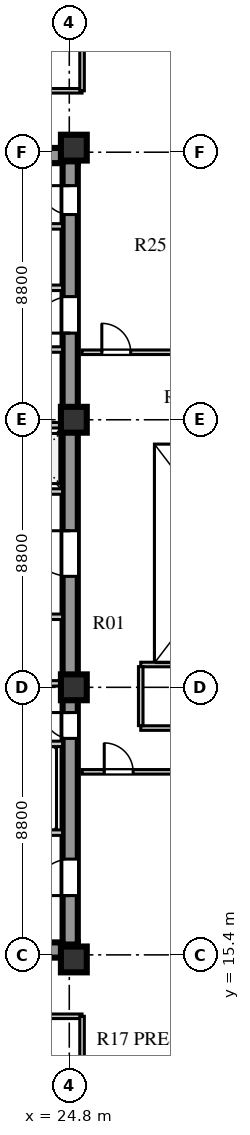
"""IFC4 building model, lengths in metres.
Left out: names, types, materials, properties, quantities, classifications, styles, units other than length and angle.
Written with IfcOpenShell. Run it as: python <this file> out.ifc"""

import sys

from ifc_helpers import new_model, si_unit, direction, frame, frame_2d, origin, origin_2d, place, context, subcontext, project, spatial, rectangle, extrude, element, fill, save


model = new_model("IFC4")
c1 = context("Model", 3, precision=1e-05, world=origin(), true_north=direction((0.0, 1.0)))
c2 = subcontext(c1, "Body", "Model", "MODEL_VIEW")
j1 = project(units=[si_unit("LENGTHUNIT", "METRE"), si_unit("PLANEANGLEUNIT", "RADIAN")], contexts=[c1])
p1 = place(None, origin())
s1 = spatial("IfcSite", under=j1, at=p1, CompositionType="ELEMENT")
p2 = place(p1, origin())
s2 = spatial("IfcBuilding", under=s1, at=p2, CompositionType="ELEMENT")
p3 = place(p2, frame((0.0, 0.0, 196.4)))
s3 = spatial("IfcBuildingStorey", under=s2, at=p3, CompositionType="ELEMENT", Elevation=196.4)
for number, where, z_axis, x_axis in (
    (1, (15.4, 15.56, 0.0), (0.0, 0.0, 1.0), (1.0, 0.0, 0.0)),
    (2, (15.4, 41.69, 0.0), (0.0, 0.0, 1.0), (1.0, 0.0, 0.0)),
):
    element("IfcWall", number, at=place(p3, frame(where, z_axis=z_axis, x_axis=x_axis)), inside=s3, PredefinedType="SHEAR", context=c2, shape_type="SweptSolid", body=[
        extrude(rectangle(XDim=9.68, YDim=0.5, at=frame_2d((4.84, 0.0))), origin(), (0.0, 0.0, 1.0), 3.6),
    ])
p4 = place(p3, frame((24.83, 15.74, 0.0), z_axis=(0.0, 0.0, 1.0), x_axis=(0.0, 1.0, 0.0)))
e3 = element("IfcWall", 3, at=p4, inside=s3, PredefinedType="SHEAR", context=c2, shape_type="SweptSolid", body=[
    extrude(rectangle(XDim=25.76, YDim=0.5, at=frame_2d((12.88, 0.0))), origin(), (0.0, 0.0, 1.0), 3.6),
])
p5 = place(p4, frame((1.61, 0.0, 0.0)))
e4 = element("IfcOpeningElement", 4, at=p5, cuts=e3, PredefinedType="OPENING", context=c2, shape_type="SweptSolid", body=[
    extrude(rectangle(XDim=1.2, YDim=2.1, at=frame_2d((0.6, 1.05))), frame((0.0, 0.26, 0.0), z_axis=(0.0, -1.0, 0.0), x_axis=(1.0, 0.0, 0.0)), (0.0, 0.0, 1.0), 0.52),
])
p6 = place(p4, frame((6.78, 0.0, 0.0)))
e5 = element("IfcOpeningElement", 5, at=p6, cuts=e3, PredefinedType="OPENING", context=c2, shape_type="SweptSolid", body=[
    extrude(rectangle(XDim=0.85, YDim=2.06, at=frame_2d((0.425, 1.03))), frame((0.0, 0.26, 0.0), z_axis=(0.0, -1.0, 0.0), x_axis=(1.0, 0.0, 0.0)), (0.0, 0.0, 1.0), 0.52),
])
p7 = place(p4, frame((12.11, 0.0, 0.0)))
e6 = element("IfcOpeningElement", 6, at=p7, cuts=e3, PredefinedType="OPENING", context=c2, shape_type="SweptSolid", body=[
    extrude(rectangle(XDim=1.5, YDim=2.12, at=frame_2d((0.75, 1.06))), frame((0.0, 0.26, 0.0), z_axis=(0.0, -1.0, 0.0), x_axis=(1.0, 0.0, 0.0)), (0.0, 0.0, 1.0), 0.52),
])
p8 = place(p4, frame((20.11, 0.0, 0.0)))
e7 = element("IfcOpeningElement", 7, at=p8, cuts=e3, PredefinedType="OPENING", context=c2, shape_type="SweptSolid", body=[
    extrude(rectangle(XDim=1.2, YDim=2.12, at=frame_2d((0.6, 1.06))), frame((0.0, 0.26, 0.0), z_axis=(0.0, -1.0, 0.0), x_axis=(1.0, 0.0, 0.0)), (0.0, 0.0, 1.0), 0.52),
])
p9 = place(p4, frame((24.01, 0.0, 0.0)))
e8 = element("IfcOpeningElement", 8, at=p9, cuts=e3, PredefinedType="OPENING", context=c2, shape_type="SweptSolid", body=[
    extrude(rectangle(XDim=0.95, YDim=2.1, at=frame_2d((0.475, 1.05))), frame((0.0, 0.26, 0.0), z_axis=(0.0, -1.0, 0.0), x_axis=(1.0, 0.0, 0.0)), (0.0, 0.0, 1.0), 0.52),
])
for number, where, z_axis, x_axis in (
    (9, (24.95, 15.25, 0.0), (0.0, 0.0, 1.0), (1.0, 0.0, 0.0)),
    (10, (24.95, 24.2, 0.0), (0.0, 0.0, 1.0), (1.0, 0.0, 0.0)),
    (11, (24.95, 33.0, 0.0), (0.0, 0.0, 1.0), (1.0, 0.0, 0.0)),
    (12, (24.95, 41.95, 0.0), (0.0, 0.0, 1.0), (1.0, 0.0, 0.0)),
):
    element("IfcColumn", number, at=place(p3, frame(where, z_axis=z_axis, x_axis=x_axis)), inside=s3, PredefinedType="COLUMN", context=c2, shape_type="SweptSolid", body=[
        extrude(rectangle(XDim=0.85, YDim=0.85, at=origin_2d()), origin(), (0.0, 0.0, 1.0), 3.6),
    ])
p10 = place(p3, frame((19.64, 19.42, 0.0), z_axis=(0.0, 0.0, 1.0), x_axis=(1.0, 0.0, 0.0)))
e13 = element("IfcWall", 13, at=p10, inside=s3, PredefinedType="SOLIDWALL", context=c2, shape_type="SweptSolid", body=[
    extrude(rectangle(XDim=4.94, YDim=0.18, at=frame_2d((2.47, 0.0))), origin(), (0.0, 0.0, 1.0), 3.6),
])
p11 = place(p10, frame((0.72, 0.0, 0.0)))
e14 = element("IfcOpeningElement", 14, at=p11, cuts=e13, PredefinedType="OPENING", context=c2, shape_type="SweptSolid", body=[
    extrude(rectangle(XDim=1.1, YDim=2.1, at=frame_2d((0.55, 1.05))), frame((0.0, 0.1, 0.0), z_axis=(0.0, -1.0, 0.0), x_axis=(1.0, 0.0, 0.0)), (0.0, 0.0, 1.0), 0.2),
])
p12 = place(p10, frame((3.02, 0.0, 0.0)))
e15 = element("IfcOpeningElement", 15, at=p12, cuts=e13, PredefinedType="OPENING", context=c2, shape_type="SweptSolid", body=[
    extrude(rectangle(XDim=1.1, YDim=2.1, at=frame_2d((0.55, 1.05))), frame((0.0, 0.1, 0.0), z_axis=(0.0, -1.0, 0.0), x_axis=(1.0, 0.0, 0.0)), (0.0, 0.0, 1.0), 0.2),
])
p13 = place(p3, frame((19.64, 22.34, 0.0), z_axis=(0.0, 0.0, 1.0), x_axis=(1.0, 0.0, 0.0)))
e16 = element("IfcWall", 16, at=p13, inside=s3, PredefinedType="SOLIDWALL", context=c2, shape_type="SweptSolid", body=[
    extrude(rectangle(XDim=4.94, YDim=0.18, at=frame_2d((2.47, 0.0))), origin(), (0.0, 0.0, 1.0), 3.6),
])
p14 = place(p3, frame((15.9, 26.52, 0.0), z_axis=(0.0, 0.0, 1.0), x_axis=(1.0, 0.0, 0.0)))
e17 = element("IfcWall", 17, at=p14, inside=s3, PredefinedType="SOLIDWALL", context=c2, shape_type="SweptSolid", body=[
    extrude(rectangle(XDim=8.68, YDim=0.18, at=frame_2d((4.34, 0.0))), origin(), (0.0, 0.0, 1.0), 3.6),
])
p15 = place(p14, frame((3.3, 0.0, 0.0)))
e18 = element("IfcOpeningElement", 18, at=p15, cuts=e17, PredefinedType="OPENING", context=c2, shape_type="SweptSolid", body=[
    extrude(rectangle(XDim=0.95, YDim=2.1, at=frame_2d((0.475, 1.05))), frame((0.0, 0.1, 0.0), z_axis=(0.0, -1.0, 0.0), x_axis=(1.0, 0.0, 0.0)), (0.0, 0.0, 1.0), 0.2),
])
p16 = place(p3, frame((15.9, 24.33, 0.0), z_axis=(0.0, 0.0, 1.0), x_axis=(1.0, 0.0, 0.0)))
e19 = element("IfcWall", 19, at=p16, inside=s3, PredefinedType="SOLIDWALL", context=c2, shape_type="SweptSolid", body=[
    extrude(rectangle(XDim=8.68, YDim=0.18, at=frame_2d((4.34, 0.0))), origin(), (0.0, 0.0, 1.0), 2.95),
])
p17 = place(p3, frame((15.9, 30.64, 0.0), z_axis=(0.0, 0.0, 1.0), x_axis=(1.0, 0.0, 0.0)))
e20 = element("IfcWall", 20, at=p17, inside=s3, PredefinedType="SOLIDWALL", context=c2, shape_type="SweptSolid", body=[
    extrude(rectangle(XDim=8.68, YDim=0.18, at=frame_2d((4.34, 0.0))), origin(), (0.0, 0.0, 1.0), 3.6),
])
p18 = place(p17, frame((1.76, 0.0, 0.0)))
e21 = element("IfcOpeningElement", 21, at=p18, cuts=e20, PredefinedType="OPENING", context=c2, shape_type="SweptSolid", body=[
    extrude(rectangle(XDim=1.0, YDim=2.1, at=frame_2d((0.5, 1.05))), frame((0.0, 0.1, 0.0), z_axis=(0.0, -1.0, 0.0), x_axis=(1.0, 0.0, 0.0)), (0.0, 0.0, 1.0), 0.2),
])
p19 = place(p17, frame((3.6, 0.0, 0.0)))
e22 = element("IfcOpeningElement", 22, at=p19, cuts=e20, PredefinedType="OPENING", context=c2, shape_type="SweptSolid", body=[
    extrude(rectangle(XDim=1.0, YDim=2.1, at=frame_2d((0.5, 1.05))), frame((0.0, 0.1, 0.0), z_axis=(0.0, -1.0, 0.0), x_axis=(1.0, 0.0, 0.0)), (0.0, 0.0, 1.0), 0.2),
])
p20 = place(p17, frame((5.44, 0.0, 0.0)))
e23 = element("IfcOpeningElement", 23, at=p20, cuts=e20, PredefinedType="OPENING", context=c2, shape_type="SweptSolid", body=[
    extrude(rectangle(XDim=1.0, YDim=2.1, at=frame_2d((0.5, 1.05))), frame((0.0, 0.1, 0.0), z_axis=(0.0, -1.0, 0.0), x_axis=(1.0, 0.0, 0.0)), (0.0, 0.0, 1.0), 0.2),
])
p21 = place(p17, frame((7.28, 0.0, 0.0)))
e24 = element("IfcOpeningElement", 24, at=p21, cuts=e20, PredefinedType="OPENING", context=c2, shape_type="SweptSolid", body=[
    extrude(rectangle(XDim=1.0, YDim=2.1, at=frame_2d((0.5, 1.05))), frame((0.0, 0.1, 0.0), z_axis=(0.0, -1.0, 0.0), x_axis=(1.0, 0.0, 0.0)), (0.0, 0.0, 1.0), 0.2),
])
p22 = place(p3, frame((15.9, 32.82, 0.0), z_axis=(0.0, 0.0, 1.0), x_axis=(1.0, 0.0, 0.0)))
e25 = element("IfcWall", 25, at=p22, inside=s3, PredefinedType="SOLIDWALL", context=c2, shape_type="SweptSolid", body=[
    extrude(rectangle(XDim=8.68, YDim=0.18, at=frame_2d((4.34, 0.0))), origin(), (0.0, 0.0, 1.0), 2.95),
])
p23 = place(p3, frame((22.02, 35.31, 0.0), z_axis=(0.0, 0.0, 1.0), x_axis=(1.0, 0.0, 0.0)))
e26 = element("IfcWall", 26, at=p23, inside=s3, PredefinedType="SOLIDWALL", context=c2, shape_type="SweptSolid", body=[
    extrude(rectangle(XDim=2.56, YDim=0.18, at=frame_2d((1.28, 0.0))), origin(), (0.0, 0.0, 1.0), 3.6),
])
p24 = place(p23, frame((0.55, 0.0, 0.0)))
e27 = element("IfcOpeningElement", 27, at=p24, cuts=e26, PredefinedType="OPENING", context=c2, shape_type="SweptSolid", body=[
    extrude(rectangle(XDim=1.0, YDim=2.1, at=frame_2d((0.5, 1.05))), frame((0.0, 0.1, 0.0), z_axis=(0.0, -1.0, 0.0), x_axis=(1.0, 0.0, 0.0)), (0.0, 0.0, 1.0), 0.2),
])
p25 = place(p3, frame((19.64, 37.34, 0.0), z_axis=(0.0, 0.0, 1.0), x_axis=(1.0, 0.0, 0.0)))
e28 = element("IfcWall", 28, at=p25, inside=s3, PredefinedType="SOLIDWALL", context=c2, shape_type="SweptSolid", body=[
    extrude(rectangle(XDim=4.94, YDim=0.18, at=frame_2d((2.47, 0.0))), origin(), (0.0, 0.0, 1.0), 3.6),
])
p26 = place(p25, frame((0.45, 0.0, 0.0)))
e29 = element("IfcOpeningElement", 29, at=p26, cuts=e28, PredefinedType="OPENING", context=c2, shape_type="SweptSolid", body=[
    extrude(rectangle(XDim=1.0, YDim=2.1, at=frame_2d((0.5, 1.05))), frame((0.0, 0.1, 0.0), z_axis=(0.0, -1.0, 0.0), x_axis=(1.0, 0.0, 0.0)), (0.0, 0.0, 1.0), 0.2),
])
p27 = place(p25, frame((2.5, 0.0, 0.0)))
e30 = element("IfcOpeningElement", 30, at=p27, cuts=e28, PredefinedType="OPENING", context=c2, shape_type="SweptSolid", body=[
    extrude(rectangle(XDim=1.0, YDim=2.1, at=frame_2d((0.5, 1.05))), frame((0.0, 0.1, 0.0), z_axis=(0.0, -1.0, 0.0), x_axis=(1.0, 0.0, 0.0)), (0.0, 0.0, 1.0), 0.2),
])
p28 = place(p3, frame((19.64, 39.36, 0.0), z_axis=(0.0, 0.0, 1.0), x_axis=(1.0, 0.0, 0.0)))
e31 = element("IfcWall", 31, at=p28, inside=s3, PredefinedType="SOLIDWALL", context=c2, shape_type="SweptSolid", body=[
    extrude(rectangle(XDim=4.94, YDim=0.18, at=frame_2d((2.47, 0.0))), origin(), (0.0, 0.0, 1.0), 3.6),
])
p29 = place(p3, frame((25.22, 21.42, 0.0), z_axis=(0.0, 0.0, 1.0), x_axis=(1.0, 0.0, 0.0)))
e32 = element("IfcWall", 32, at=p29, inside=s3, PredefinedType="PARTITIONING", context=c2, shape_type="SweptSolid", body=[
    extrude(rectangle(XDim=15.6, YDim=0.15, at=frame_2d((7.8, 0.0))), origin(), (0.0, 0.0, 1.0), 3.25),
])
p30 = place(p29, frame((0.73, 0.0, 0.0)))
e33 = element("IfcOpeningElement", 33, at=p30, cuts=e32, PredefinedType="OPENING", context=c2, shape_type="SweptSolid", body=[
    extrude(rectangle(XDim=0.95, YDim=2.1, at=frame_2d((0.475, 1.05))), frame((0.0, 0.085, 0.0), z_axis=(0.0, -1.0, 0.0), x_axis=(1.0, 0.0, 0.0)), (0.0, 0.0, 1.0), 0.17),
])
p31 = place(p3, frame((27.15, 22.86, 0.0), z_axis=(0.0, 0.0, 1.0), x_axis=(1.0, 0.0, 0.0)))
e34 = element("IfcWall", 34, at=p31, inside=s3, PredefinedType="PARTITIONING", context=c2, shape_type="SweptSolid", body=[
    extrude(rectangle(XDim=13.67, YDim=0.15, at=frame_2d((6.835, 0.0))), origin(), (0.0, 0.0, 1.0), 3.6),
])
p32 = place(p31, frame((2.2, 0.0, 0.0)))
e35 = element("IfcOpeningElement", 35, at=p32, cuts=e34, PredefinedType="OPENING", context=c2, shape_type="SweptSolid", body=[
    extrude(rectangle(XDim=0.9, YDim=2.08, at=frame_2d((0.45, 1.04))), frame((0.0, 0.085, 0.0), z_axis=(0.0, -1.0, 0.0), x_axis=(1.0, 0.0, 0.0)), (0.0, 0.0, 1.0), 0.17),
])
p33 = place(p3, frame((25.22, 35.22, 0.0), z_axis=(0.0, 0.0, 1.0), x_axis=(1.0, 0.0, 0.0)))
e36 = element("IfcWall", 36, at=p33, inside=s3, PredefinedType="PARTITIONING", context=c2, shape_type="SweptSolid", body=[
    extrude(rectangle(XDim=9.5, YDim=0.15, at=frame_2d((4.75, 0.0))), origin(), (0.0, 0.0, 1.0), 3.6),
])
p34 = place(p33, frame((0.65, 0.0, 0.0)))
e37 = element("IfcOpeningElement", 37, at=p34, cuts=e36, PredefinedType="OPENING", context=c2, shape_type="SweptSolid", body=[
    extrude(rectangle(XDim=0.95, YDim=2.1, at=frame_2d((0.475, 1.05))), frame((0.0, 0.085, 0.0), z_axis=(0.0, -1.0, 0.0), x_axis=(1.0, 0.0, 0.0)), (0.0, 0.0, 1.0), 0.17),
])
p35 = place(p33, frame((5.2, 0.0, 0.0)))
e38 = element("IfcOpeningElement", 38, at=p35, cuts=e36, PredefinedType="OPENING", context=c2, shape_type="SweptSolid", body=[
    extrude(rectangle(XDim=0.95, YDim=2.1, at=frame_2d((0.475, 1.05))), frame((0.0, 0.085, 0.0), z_axis=(0.0, -1.0, 0.0), x_axis=(1.0, 0.0, 0.0)), (0.0, 0.0, 1.0), 0.17),
])
p36 = place(p3, frame((13.39, 13.38, 0.0), z_axis=(0.0, 0.0, 1.0), x_axis=(1.0, 0.0, 0.0)))
e39 = element("IfcWall", 39, at=p36, inside=s3, PredefinedType="PARTITIONING", context=c2, shape_type="SweptSolid", body=[
    extrude(rectangle(XDim=11.83, YDim=0.15, at=frame_2d((5.915, 0.0))), origin(), (0.0, 0.0, 1.0), 3.6),
])
p37 = place(p36, frame((4.76, 0.0, 0.0)))
e40 = element("IfcOpeningElement", 40, at=p37, cuts=e39, PredefinedType="OPENING", context=c2, shape_type="SweptSolid", body=[
    extrude(rectangle(XDim=1.0, YDim=2.08, at=frame_2d((0.5, 1.04))), frame((0.0, 0.085, 0.0), z_axis=(0.0, -1.0, 0.0), x_axis=(1.0, 0.0, 0.0)), (0.0, 0.0, 1.0), 0.17),
])
p38 = place(p3, frame((25.22, 7.88, 0.0), z_axis=(0.0, 0.0, 1.0), x_axis=(0.0, 1.0, 0.0)))
e41 = element("IfcWall", 41, at=p38, inside=s3, PredefinedType="PARTITIONING", context=c2, shape_type="SweptSolid", body=[
    extrude(rectangle(XDim=5.5, YDim=0.15, at=frame_2d((2.75, 0.0))), origin(), (0.0, 0.0, 1.0), 3.15),
])
p39 = place(p3, frame((13.39, 43.82, 0.0), z_axis=(0.0, 0.0, 1.0), x_axis=(1.0, 0.0, 0.0)))
e42 = element("IfcWall", 42, at=p39, inside=s3, PredefinedType="PARTITIONING", context=c2, shape_type="SweptSolid", body=[
    extrude(rectangle(XDim=11.83, YDim=0.15, at=frame_2d((5.915, 0.0))), origin(), (0.0, 0.0, 1.0), 3.6),
])
p40 = place(p39, frame((4.76, 0.0, 0.0)))
e43 = element("IfcOpeningElement", 43, at=p40, cuts=e42, PredefinedType="OPENING", context=c2, shape_type="SweptSolid", body=[
    extrude(rectangle(XDim=1.0, YDim=2.08, at=frame_2d((0.5, 1.04))), frame((0.0, 0.085, 0.0), z_axis=(0.0, -1.0, 0.0), x_axis=(1.0, 0.0, 0.0)), (0.0, 0.0, 1.0), 0.17),
])
p41 = place(p3, frame((25.22, 43.82, 0.0), z_axis=(0.0, 0.0, 1.0), x_axis=(0.0, 1.0, 0.0)))
e44 = element("IfcWall", 44, at=p41, inside=s3, PredefinedType="PARTITIONING", context=c2, shape_type="SweptSolid", body=[
    extrude(rectangle(XDim=5.5, YDim=0.15, at=frame_2d((2.75, 0.0))), origin(), (0.0, 0.0, 1.0), 3.15),
])
p42 = place(p3, frame((27.15, 24.95, 0.0), z_axis=(0.0, 0.0, 1.0), x_axis=(1.0, 0.0, 0.0)))
e45 = element("IfcWall", 45, at=p42, inside=s3, PredefinedType="PARTITIONING", context=c2, shape_type="SweptSolid", body=[
    extrude(rectangle(XDim=9.67, YDim=0.15, at=frame_2d((4.835, 0.0))), origin(), (0.0, 0.0, 1.0), 3.05),
])
p43 = place(p3, frame((27.15, 22.94, 0.0), z_axis=(0.0, 0.0, 1.0), x_axis=(0.0, 1.0, 0.0)))
e46 = element("IfcWall", 46, at=p43, inside=s3, PredefinedType="PARTITIONING", context=c2, shape_type="SweptSolid", body=[
    extrude(rectangle(XDim=1.94, YDim=0.15, at=frame_2d((0.97, 0.0))), origin(), (0.0, 0.0, 1.0), 3.6),
])
p44 = place(p5, frame((1.2, 0.0, 0.0), z_axis=(0.0, 0.0, 1.0), x_axis=(-1.0, 0.0, 0.0)))
e47 = element("IfcDoor", 47, at=p44, inside=s3, OperationType="SINGLE_SWING_RIGHT", PredefinedType="DOOR", context=c2, shape_type="SweptSolid", body=[
    extrude(rectangle(XDim=1.2, YDim=2.1, at=frame_2d((0.6, 1.05))), frame((0.0, 0.025, 0.0), z_axis=(0.0, -1.0, 0.0), x_axis=(1.0, 0.0, 0.0)), (0.0, 0.0, 1.0), 0.05),
])
fill(e4, e47)
p45 = place(p6, frame((0.85, 0.0, 0.0), z_axis=(0.0, 0.0, 1.0), x_axis=(-1.0, 0.0, 0.0)))
e48 = element("IfcDoor", 48, at=p45, inside=s3, OperationType="SINGLE_SWING_LEFT", PredefinedType="DOOR", context=c2, shape_type="SweptSolid", body=[
    extrude(rectangle(XDim=0.85, YDim=2.06, at=frame_2d((0.425, 1.03))), frame((0.0, 0.025, 0.0), z_axis=(0.0, -1.0, 0.0), x_axis=(1.0, 0.0, 0.0)), (0.0, 0.0, 1.0), 0.05),
])
fill(e5, e48)
p46 = place(p7, frame((1.5, 0.0, 0.0), z_axis=(0.0, 0.0, 1.0), x_axis=(-1.0, 0.0, 0.0)))
e49 = element("IfcDoor", 49, at=p46, inside=s3, OperationType="SINGLE_SWING_LEFT", PredefinedType="DOOR", context=c2, shape_type="SweptSolid", body=[
    extrude(rectangle(XDim=1.5, YDim=2.12, at=frame_2d((0.75, 1.06))), frame((0.0, 0.025, 0.0), z_axis=(0.0, -1.0, 0.0), x_axis=(1.0, 0.0, 0.0)), (0.0, 0.0, 1.0), 0.05),
])
fill(e6, e49)
p47 = place(p8, frame((1.2, 0.0, 0.0), z_axis=(0.0, 0.0, 1.0), x_axis=(-1.0, 0.0, 0.0)))
e50 = element("IfcDoor", 50, at=p47, inside=s3, OperationType="SINGLE_SWING_RIGHT", PredefinedType="DOOR", context=c2, shape_type="SweptSolid", body=[
    extrude(rectangle(XDim=1.2, YDim=2.12, at=frame_2d((0.6, 1.06))), frame((0.0, 0.025, 0.0), z_axis=(0.0, -1.0, 0.0), x_axis=(1.0, 0.0, 0.0)), (0.0, 0.0, 1.0), 0.05),
])
fill(e7, e50)
p48 = place(p9, frame((0.95, 0.0, 0.0), z_axis=(0.0, 0.0, 1.0), x_axis=(-1.0, 0.0, 0.0)))
e51 = element("IfcDoor", 51, at=p48, inside=s3, OperationType="SINGLE_SWING_LEFT", PredefinedType="DOOR", context=c2, shape_type="SweptSolid", body=[
    extrude(rectangle(XDim=0.95, YDim=2.1, at=frame_2d((0.475, 1.05))), frame((0.0, 0.025, 0.0), z_axis=(0.0, -1.0, 0.0), x_axis=(1.0, 0.0, 0.0)), (0.0, 0.0, 1.0), 0.05),
])
fill(e8, e51)
p49 = place(p30, frame((0.95, 0.0, 0.0), z_axis=(0.0, 0.0, 1.0), x_axis=(-1.0, 0.0, 0.0)))
e52 = element("IfcDoor", 52, at=p49, inside=s3, OperationType="SINGLE_SWING_RIGHT", PredefinedType="DOOR", context=c2, shape_type="SweptSolid", body=[
    extrude(rectangle(XDim=0.95, YDim=2.1, at=frame_2d((0.475, 1.05))), frame((0.0, 0.025, 0.0), z_axis=(0.0, -1.0, 0.0), x_axis=(1.0, 0.0, 0.0)), (0.0, 0.0, 1.0), 0.05),
])
fill(e33, e52)
p50 = place(p34, origin())
e53 = element("IfcDoor", 53, at=p50, inside=s3, OperationType="SINGLE_SWING_LEFT", PredefinedType="DOOR", context=c2, shape_type="SweptSolid", body=[
    extrude(rectangle(XDim=0.95, YDim=2.1, at=frame_2d((0.475, 1.05))), frame((0.0, 0.025, 0.0), z_axis=(0.0, -1.0, 0.0), x_axis=(1.0, 0.0, 0.0)), (0.0, 0.0, 1.0), 0.05),
])
fill(e37, e53)
save(model, sys.argv[1])
